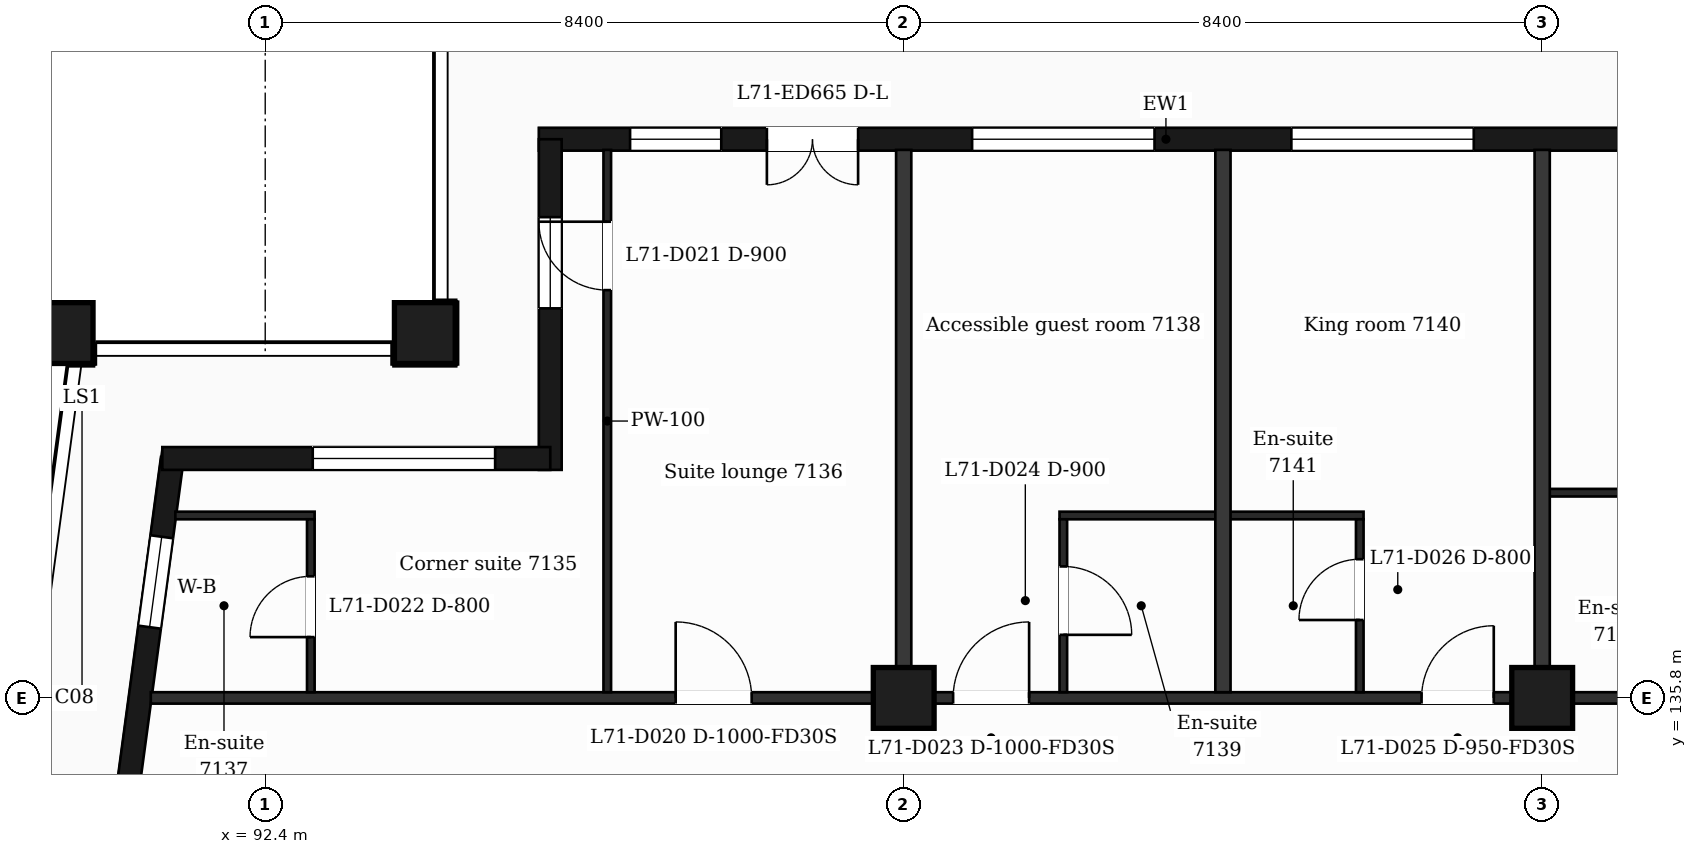
"""IFC4 building model, lengths in metres.
Left out: names, types, materials, properties, quantities, classifications, styles, units other than length and angle.
Written with IfcOpenShell. Run it as: python <this file> out.ifc"""

import sys

from ifc_helpers import new_model, si_unit, direction, frame, frame_2d, origin, origin_2d, place, context, subcontext, project, spatial, rectangle, extrude, element, fill, save


model = new_model("IFC4")
c1 = context("Model", 3, precision=1e-05, world=origin(), true_north=direction((0.0, 1.0)))
c2 = subcontext(c1, "Body", "Model", "MODEL_VIEW")
j1 = project(units=[si_unit("LENGTHUNIT", "METRE"), si_unit("PLANEANGLEUNIT", "RADIAN")], contexts=[c1])
p1 = place(None, origin())
s1 = spatial("IfcSite", under=j1, at=p1, CompositionType="ELEMENT")
p2 = place(p1, origin())
s2 = spatial("IfcBuilding", under=s1, at=p2, CompositionType="ELEMENT")
p3 = place(p2, frame((0.0, 0.0, 292.3)))
s3 = spatial("IfcBuildingStorey", under=s2, at=p3, CompositionType="ELEMENT", Elevation=292.3)
for number, where, z_axis, x_axis in (
    (1, (94.5, 140.6, 0.0), (0.0, 0.0, 1.0), (1.0, 0.0, 0.0)),
    (2, (89.735, 140.6, 0.0), (0.0, 0.0, 1.0), (1.0, 0.0, 0.0)),
    (3, (100.8, 135.8, 0.0), (0.0, 0.0, 1.0), (1.0, 0.0, 0.0)),
    (4, (109.2, 135.8, 0.0), (0.0, 0.0, 1.0), (1.0, 0.0, 0.0)),
):
    element("IfcColumn", number, at=place(p3, frame(where, z_axis=z_axis, x_axis=x_axis)), inside=s3, PredefinedType="COLUMN", context=c2, shape_type="SweptSolid", body=[
        extrude(rectangle(XDim=0.8, YDim=0.8, at=origin_2d()), origin(), (0.0, 0.0, 1.0), 3.7),
    ])
p4 = place(p3, frame((91.177, 138.95, 0.0), z_axis=(0.0, 0.0, 1.0), x_axis=(-0.133426664613, -0.991058689065, 0.0)))
e5 = element("IfcWall", 5, at=p4, inside=s3, PredefinedType="SOLIDWALL", context=c2, shape_type="SweptSolid", body=[
    extrude(rectangle(XDim=6.609, YDim=0.3, at=frame_2d((3.305, 0.0))), origin(), (0.0, 0.0, 1.0), 3.38),
])
p5 = place(p4, frame((1.039, 0.0, 0.9)))
e6 = element("IfcOpeningElement", 6, at=p5, cuts=e5, PredefinedType="OPENING", context=c2, shape_type="SweptSolid", body=[
    extrude(rectangle(XDim=1.2, YDim=2.1, at=frame_2d((0.6, 1.05))), frame((0.0, 0.16, 0.0), z_axis=(0.0, -1.0, 0.0), x_axis=(1.0, 0.0, 0.0)), (0.0, 0.0, 1.0), 0.32),
])
p6 = place(p4, frame((4.294, 0.0, 0.0)))
e7 = element("IfcOpeningElement", 7, at=p6, cuts=e5, PredefinedType="OPENING", context=c2, shape_type="SweptSolid", body=[
    extrude(rectangle(XDim=1.2, YDim=2.4, at=frame_2d((0.6, 1.2))), frame((0.0, 0.16, 0.0), z_axis=(0.0, -1.0, 0.0), x_axis=(1.0, 0.0, 0.0)), (0.0, 0.0, 1.0), 0.32),
])
p7 = place(p3, frame((112.5, 143.15, 0.0), z_axis=(0.0, 0.0, 1.0), x_axis=(-1.0, 0.0, 0.0)))
e8 = element("IfcWall", 8, at=p7, inside=s3, PredefinedType="SOLIDWALL", context=c2, shape_type="SweptSolid", body=[
    extrude(rectangle(XDim=16.5, YDim=0.3, at=frame_2d((8.25, 0.0))), origin(), (0.0, 0.0, 1.0), 3.38),
])
p8 = place(p7, frame((1.1, 0.0, 0.9)))
e9 = element("IfcOpeningElement", 9, at=p8, cuts=e8, PredefinedType="OPENING", context=c2, shape_type="SweptSolid", body=[
    extrude(rectangle(XDim=1.2, YDim=2.1, at=frame_2d((0.6, 1.05))), frame((0.0, 0.16, 0.0), z_axis=(0.0, -1.0, 0.0), x_axis=(1.0, 0.0, 0.0)), (0.0, 0.0, 1.0), 0.32),
])
p9 = place(p7, frame((4.2, 0.0, 0.9)))
e10 = element("IfcOpeningElement", 10, at=p9, cuts=e8, PredefinedType="OPENING", context=c2, shape_type="SweptSolid", body=[
    extrude(rectangle(XDim=2.4, YDim=2.1, at=frame_2d((1.2, 1.05))), frame((0.0, 0.16, 0.0), z_axis=(0.0, -1.0, 0.0), x_axis=(1.0, 0.0, 0.0)), (0.0, 0.0, 1.0), 0.32),
])
p10 = place(p7, frame((8.4, 0.0, 0.9)))
e11 = element("IfcOpeningElement", 11, at=p10, cuts=e8, PredefinedType="OPENING", context=c2, shape_type="SweptSolid", body=[
    extrude(rectangle(XDim=2.4, YDim=2.1, at=frame_2d((1.2, 1.05))), frame((0.0, 0.16, 0.0), z_axis=(0.0, -1.0, 0.0), x_axis=(1.0, 0.0, 0.0)), (0.0, 0.0, 1.0), 0.32),
])
p11 = place(p7, frame((12.3, 0.0, 0.0)))
e12 = element("IfcOpeningElement", 12, at=p11, cuts=e8, PredefinedType="OPENING", context=c2, shape_type="SweptSolid", body=[
    extrude(rectangle(XDim=1.2, YDim=2.4, at=frame_2d((0.6, 1.2))), frame((0.0, 0.16, 0.0), z_axis=(0.0, -1.0, 0.0), x_axis=(1.0, 0.0, 0.0)), (0.0, 0.0, 1.0), 0.32),
])
p12 = place(p7, frame((14.1, 0.0, 0.9)))
e13 = element("IfcOpeningElement", 13, at=p12, cuts=e8, PredefinedType="OPENING", context=c2, shape_type="SweptSolid", body=[
    extrude(rectangle(XDim=1.2, YDim=2.1, at=frame_2d((0.6, 1.05))), frame((0.0, 0.16, 0.0), z_axis=(0.0, -1.0, 0.0), x_axis=(1.0, 0.0, 0.0)), (0.0, 0.0, 1.0), 0.32),
])
p13 = place(p3, frame((96.15, 143.15, 0.0), z_axis=(0.0, 0.0, 1.0), x_axis=(0.0, -1.0, 0.0)))
e14 = element("IfcWall", 14, at=p13, inside=s3, PredefinedType="SOLIDWALL", context=c2, shape_type="SweptSolid", body=[
    extrude(rectangle(XDim=4.35, YDim=0.3, at=frame_2d((2.175, 0.0))), origin(), (0.0, 0.0, 1.0), 3.38),
])
p14 = place(p13, frame((1.025, 0.0, 0.9)))
e15 = element("IfcOpeningElement", 15, at=p14, cuts=e14, PredefinedType="OPENING", context=c2, shape_type="SweptSolid", body=[
    extrude(rectangle(XDim=1.2, YDim=2.1, at=frame_2d((0.6, 1.05))), frame((0.0, 0.16, 0.0), z_axis=(0.0, -1.0, 0.0), x_axis=(1.0, 0.0, 0.0)), (0.0, 0.0, 1.0), 0.32),
])
p15 = place(p3, frame((96.15, 138.95, 0.0), z_axis=(0.0, 0.0, 1.0), x_axis=(-1.0, 0.0, 0.0)))
e16 = element("IfcWall", 16, at=p15, inside=s3, PredefinedType="SOLIDWALL", context=c2, shape_type="SweptSolid", body=[
    extrude(rectangle(XDim=5.104, YDim=0.3, at=frame_2d((2.552, 0.0))), origin(), (0.0, 0.0, 1.0), 3.38),
])
p16 = place(p15, frame((0.725, 0.0, 0.9)))
e17 = element("IfcOpeningElement", 17, at=p16, cuts=e16, PredefinedType="OPENING", context=c2, shape_type="SweptSolid", body=[
    extrude(rectangle(XDim=2.4, YDim=2.1, at=frame_2d((1.2, 1.05))), frame((0.0, 0.16, 0.0), z_axis=(0.0, -1.0, 0.0), x_axis=(1.0, 0.0, 0.0)), (0.0, 0.0, 1.0), 0.32),
])
p17 = place(p3, frame((90.895, 135.8, 0.0), z_axis=(0.0, 0.0, 1.0), x_axis=(1.0, 0.0, 0.0)))
e18 = element("IfcWall", 18, at=p17, inside=s3, PredefinedType="PARTITIONING", context=c2, shape_type="SweptSolid", body=[
    extrude(rectangle(XDim=45.011, YDim=0.15, at=frame_2d((22.505, 0.0))), origin(), (0.0, 0.0, 1.0), 3.38),
])
p18 = place(p17, frame((6.906, 0.0, 0.0)))
e19 = element("IfcOpeningElement", 19, at=p18, cuts=e18, PredefinedType="OPENING", context=c2, shape_type="SweptSolid", body=[
    extrude(rectangle(XDim=1.0, YDim=2.1, at=frame_2d((0.5, 1.05))), frame((0.0, 0.085, 0.0), z_axis=(0.0, -1.0, 0.0), x_axis=(1.0, 0.0, 0.0)), (0.0, 0.0, 1.0), 0.17),
])
p19 = place(p17, frame((10.555, 0.0, 0.0)))
e20 = element("IfcOpeningElement", 20, at=p19, cuts=e18, PredefinedType="OPENING", context=c2, shape_type="SweptSolid", body=[
    extrude(rectangle(XDim=1.0, YDim=2.1, at=frame_2d((0.5, 1.05))), frame((0.0, 0.085, 0.0), z_axis=(0.0, -1.0, 0.0), x_axis=(1.0, 0.0, 0.0)), (0.0, 0.0, 1.0), 0.17),
])
p20 = place(p17, frame((16.719, 0.0, 0.0)))
e21 = element("IfcOpeningElement", 21, at=p20, cuts=e18, PredefinedType="OPENING", context=c2, shape_type="SweptSolid", body=[
    extrude(rectangle(XDim=0.95, YDim=2.1, at=frame_2d((0.475, 1.05))), frame((0.0, 0.085, 0.0), z_axis=(0.0, -1.0, 0.0), x_axis=(1.0, 0.0, 0.0)), (0.0, 0.0, 1.0), 0.17),
])
p21 = place(p17, frame((21.281, 0.0, 0.0)))
e22 = element("IfcOpeningElement", 22, at=p21, cuts=e18, PredefinedType="OPENING", context=c2, shape_type="SweptSolid", body=[
    extrude(rectangle(XDim=0.95, YDim=2.1, at=frame_2d((0.475, 1.05))), frame((0.0, 0.085, 0.0), z_axis=(0.0, -1.0, 0.0), x_axis=(1.0, 0.0, 0.0)), (0.0, 0.0, 1.0), 0.17),
])
p22 = place(p17, frame((25.125, 0.0, 0.0)))
e23 = element("IfcOpeningElement", 23, at=p22, cuts=e18, PredefinedType="OPENING", context=c2, shape_type="SweptSolid", body=[
    extrude(rectangle(XDim=0.95, YDim=2.1, at=frame_2d((0.475, 1.05))), frame((0.0, 0.085, 0.0), z_axis=(0.0, -1.0, 0.0), x_axis=(1.0, 0.0, 0.0)), (0.0, 0.0, 1.0), 0.17),
])
p23 = place(p17, frame((27.393, 0.0, 0.0)))
e24 = element("IfcOpeningElement", 24, at=p23, cuts=e18, PredefinedType="OPENING", context=c2, shape_type="SweptSolid", body=[
    extrude(rectangle(XDim=0.95, YDim=2.1, at=frame_2d((0.475, 1.05))), frame((0.0, 0.085, 0.0), z_axis=(0.0, -1.0, 0.0), x_axis=(1.0, 0.0, 0.0)), (0.0, 0.0, 1.0), 0.17),
])
p24 = place(p17, frame((33.518, 0.0, 0.0)))
e25 = element("IfcOpeningElement", 25, at=p24, cuts=e18, PredefinedType="OPENING", context=c2, shape_type="SweptSolid", body=[
    extrude(rectangle(XDim=0.95, YDim=2.1, at=frame_2d((0.475, 1.05))), frame((0.0, 0.085, 0.0), z_axis=(0.0, -1.0, 0.0), x_axis=(1.0, 0.0, 0.0)), (0.0, 0.0, 1.0), 0.17),
])
p25 = place(p17, frame((37.195, 0.0, 0.0)))
e26 = element("IfcOpeningElement", 26, at=p25, cuts=e18, PredefinedType="OPENING", context=c2, shape_type="SweptSolid", body=[
    extrude(rectangle(XDim=1.0, YDim=2.1, at=frame_2d((0.5, 1.05))), frame((0.0, 0.085, 0.0), z_axis=(0.0, -1.0, 0.0), x_axis=(1.0, 0.0, 0.0)), (0.0, 0.0, 1.0), 0.17),
])
p26 = place(p3, frame((91.218, 138.2, 0.0), z_axis=(0.0, 0.0, 1.0), x_axis=(1.0, 0.0, 0.0)))
e27 = element("IfcWall", 27, at=p26, inside=s3, PredefinedType="PARTITIONING", context=c2, shape_type="SweptSolid", body=[
    extrude(rectangle(XDim=1.832, YDim=0.1, at=frame_2d((0.916, 0.0))), origin(), (0.0, 0.0, 1.0), 3.38),
])
p27 = place(p3, frame((102.85, 138.2, 0.0), z_axis=(0.0, 0.0, 1.0), x_axis=(1.0, 0.0, 0.0)))
e28 = element("IfcWall", 28, at=p27, inside=s3, PredefinedType="PARTITIONING", context=c2, shape_type="SweptSolid", body=[
    extrude(rectangle(XDim=4.0, YDim=0.1, at=frame_2d((2.0, 0.0))), origin(), (0.0, 0.0, 1.0), 3.38),
])
p28 = place(p3, frame((109.2, 138.5, 0.0), z_axis=(0.0, 0.0, 1.0), x_axis=(1.0, 0.0, 0.0)))
e29 = element("IfcWall", 29, at=p28, inside=s3, PredefinedType="PARTITIONING", context=c2, shape_type="SweptSolid", body=[
    extrude(rectangle(XDim=2.75, YDim=0.1, at=frame_2d((1.375, 0.0))), origin(), (0.0, 0.0, 1.0), 3.38),
])
p29 = place(p3, frame((93.0, 135.875, 0.0), z_axis=(0.0, 0.0, 1.0), x_axis=(0.0, 1.0, 0.0)))
e30 = element("IfcWall", 30, at=p29, inside=s3, PredefinedType="PARTITIONING", context=c2, shape_type="SweptSolid", body=[
    extrude(rectangle(XDim=2.275, YDim=0.1, at=frame_2d((1.137, 0.0))), origin(), (0.0, 0.0, 1.0), 3.38),
])
p30 = place(p29, frame((0.725, 0.0, 0.0)))
e31 = element("IfcOpeningElement", 31, at=p30, cuts=e30, PredefinedType="OPENING", context=c2, shape_type="SweptSolid", body=[
    extrude(rectangle(XDim=0.8, YDim=2.1, at=frame_2d((0.4, 1.05))), frame((0.0, 0.06, 0.0), z_axis=(0.0, -1.0, 0.0), x_axis=(1.0, 0.0, 0.0)), (0.0, 0.0, 1.0), 0.12),
])
p31 = place(p3, frame((96.9, 135.875, 0.0), z_axis=(0.0, 0.0, 1.0), x_axis=(0.0, 1.0, 0.0)))
e32 = element("IfcWall", 32, at=p31, inside=s3, PredefinedType="PARTITIONING", context=c2, shape_type="SweptSolid", body=[
    extrude(rectangle(XDim=7.135, YDim=0.1, at=frame_2d((3.567, 0.0))), origin(), (0.0, 0.0, 1.0), 3.38),
])
p32 = place(p31, frame((5.29, 0.0, 0.0)))
e33 = element("IfcOpeningElement", 33, at=p32, cuts=e32, PredefinedType="OPENING", context=c2, shape_type="SweptSolid", body=[
    extrude(rectangle(XDim=0.9, YDim=2.1, at=frame_2d((0.45, 1.05))), frame((0.0, 0.06, 0.0), z_axis=(0.0, -1.0, 0.0), x_axis=(1.0, 0.0, 0.0)), (0.0, 0.0, 1.0), 0.12),
])
p33 = place(p3, frame((100.8, 135.875, 0.0), z_axis=(0.0, 0.0, 1.0), x_axis=(0.0, 1.0, 0.0)))
e34 = element("IfcWall", 34, at=p33, inside=s3, PredefinedType="PARTITIONING", context=c2, shape_type="SweptSolid", body=[
    extrude(rectangle(XDim=7.135, YDim=0.2, at=frame_2d((3.567, 0.0))), origin(), (0.0, 0.0, 1.0), 3.38),
])
p34 = place(p3, frame((102.9, 135.875, 0.0), z_axis=(0.0, 0.0, 1.0), x_axis=(0.0, 1.0, 0.0)))
e35 = element("IfcWall", 35, at=p34, inside=s3, PredefinedType="PARTITIONING", context=c2, shape_type="SweptSolid", body=[
    extrude(rectangle(XDim=2.275, YDim=0.1, at=frame_2d((1.137, 0.0))), origin(), (0.0, 0.0, 1.0), 3.38),
])
p35 = place(p34, frame((0.755, 0.0, 0.0)))
e36 = element("IfcOpeningElement", 36, at=p35, cuts=e35, PredefinedType="OPENING", context=c2, shape_type="SweptSolid", body=[
    extrude(rectangle(XDim=0.9, YDim=2.1, at=frame_2d((0.45, 1.05))), frame((0.0, 0.06, 0.0), z_axis=(0.0, -1.0, 0.0), x_axis=(1.0, 0.0, 0.0)), (0.0, 0.0, 1.0), 0.12),
])
p36 = place(p3, frame((105.0, 135.875, 0.0), z_axis=(0.0, 0.0, 1.0), x_axis=(0.0, 1.0, 0.0)))
e37 = element("IfcWall", 37, at=p36, inside=s3, PredefinedType="PARTITIONING", context=c2, shape_type="SweptSolid", body=[
    extrude(rectangle(XDim=7.135, YDim=0.2, at=frame_2d((3.567, 0.0))), origin(), (0.0, 0.0, 1.0), 3.38),
])
p37 = place(p3, frame((106.8, 135.875, 0.0), z_axis=(0.0, 0.0, 1.0), x_axis=(0.0, 1.0, 0.0)))
e38 = element("IfcWall", 38, at=p37, inside=s3, PredefinedType="PARTITIONING", context=c2, shape_type="SweptSolid", body=[
    extrude(rectangle(XDim=2.275, YDim=0.1, at=frame_2d((1.137, 0.0))), origin(), (0.0, 0.0, 1.0), 3.38),
])
p38 = place(p37, frame((0.95, 0.0, 0.0)))
e39 = element("IfcOpeningElement", 39, at=p38, cuts=e38, PredefinedType="OPENING", context=c2, shape_type="SweptSolid", body=[
    extrude(rectangle(XDim=0.8, YDim=2.1, at=frame_2d((0.4, 1.05))), frame((0.0, 0.06, 0.0), z_axis=(0.0, -1.0, 0.0), x_axis=(1.0, 0.0, 0.0)), (0.0, 0.0, 1.0), 0.12),
])
p39 = place(p3, frame((109.2, 135.875, 0.0), z_axis=(0.0, 0.0, 1.0), x_axis=(0.0, 1.0, 0.0)))
e40 = element("IfcWall", 40, at=p39, inside=s3, PredefinedType="PARTITIONING", context=c2, shape_type="SweptSolid", body=[
    extrude(rectangle(XDim=7.135, YDim=0.2, at=frame_2d((3.567, 0.0))), origin(), (0.0, 0.0, 1.0), 3.38),
])
p40 = place(p5, origin())
e41 = element("IfcWindow", 41, at=p40, inside=s3, PartitioningType="SINGLE_PANEL", PredefinedType="WINDOW", context=c2, shape_type="SweptSolid", body=[
    extrude(rectangle(XDim=1.2, YDim=2.1, at=frame_2d((0.6, 1.05))), frame((0.0, 0.03, 0.0), z_axis=(0.0, -1.0, 0.0), x_axis=(1.0, 0.0, 0.0)), (0.0, 0.0, 1.0), 0.06),
])
fill(e6, e41)
p41 = place(p8, origin())
e42 = element("IfcWindow", 42, at=p41, inside=s3, PartitioningType="SINGLE_PANEL", PredefinedType="WINDOW", context=c2, shape_type="SweptSolid", body=[
    extrude(rectangle(XDim=1.2, YDim=2.1, at=frame_2d((0.6, 1.05))), frame((0.0, 0.03, 0.0), z_axis=(0.0, -1.0, 0.0), x_axis=(1.0, 0.0, 0.0)), (0.0, 0.0, 1.0), 0.06),
])
fill(e9, e42)
p42 = place(p9, origin())
e43 = element("IfcWindow", 43, at=p42, inside=s3, PartitioningType="SINGLE_PANEL", PredefinedType="WINDOW", context=c2, shape_type="SweptSolid", body=[
    extrude(rectangle(XDim=2.4, YDim=2.1, at=frame_2d((1.2, 1.05))), frame((0.0, 0.03, 0.0), z_axis=(0.0, -1.0, 0.0), x_axis=(1.0, 0.0, 0.0)), (0.0, 0.0, 1.0), 0.06),
])
fill(e10, e43)
p43 = place(p10, origin())
e44 = element("IfcWindow", 44, at=p43, inside=s3, PartitioningType="SINGLE_PANEL", PredefinedType="WINDOW", context=c2, shape_type="SweptSolid", body=[
    extrude(rectangle(XDim=2.4, YDim=2.1, at=frame_2d((1.2, 1.05))), frame((0.0, 0.03, 0.0), z_axis=(0.0, -1.0, 0.0), x_axis=(1.0, 0.0, 0.0)), (0.0, 0.0, 1.0), 0.06),
])
fill(e11, e44)
p44 = place(p11, origin())
e45 = element("IfcDoor", 45, at=p44, inside=s3, OperationType="DOUBLE_DOOR_SINGLE_SWING", PredefinedType="DOOR", context=c2, shape_type="SweptSolid", body=[
    extrude(rectangle(XDim=1.2, YDim=2.4, at=frame_2d((0.6, 1.2))), frame((0.0, 0.025, 0.0), z_axis=(0.0, -1.0, 0.0), x_axis=(1.0, 0.0, 0.0)), (0.0, 0.0, 1.0), 0.05),
])
fill(e12, e45)
p45 = place(p12, origin())
e46 = element("IfcWindow", 46, at=p45, inside=s3, PartitioningType="SINGLE_PANEL", PredefinedType="WINDOW", context=c2, shape_type="SweptSolid", body=[
    extrude(rectangle(XDim=1.2, YDim=2.1, at=frame_2d((0.6, 1.05))), frame((0.0, 0.03, 0.0), z_axis=(0.0, -1.0, 0.0), x_axis=(1.0, 0.0, 0.0)), (0.0, 0.0, 1.0), 0.06),
])
fill(e13, e46)
p46 = place(p14, origin())
e47 = element("IfcWindow", 47, at=p46, inside=s3, PartitioningType="SINGLE_PANEL", PredefinedType="WINDOW", context=c2, shape_type="SweptSolid", body=[
    extrude(rectangle(XDim=1.2, YDim=2.1, at=frame_2d((0.6, 1.05))), frame((0.0, 0.03, 0.0), z_axis=(0.0, -1.0, 0.0), x_axis=(1.0, 0.0, 0.0)), (0.0, 0.0, 1.0), 0.06),
])
fill(e15, e47)
p47 = place(p16, origin())
e48 = element("IfcWindow", 48, at=p47, inside=s3, PartitioningType="SINGLE_PANEL", PredefinedType="WINDOW", context=c2, shape_type="SweptSolid", body=[
    extrude(rectangle(XDim=2.4, YDim=2.1, at=frame_2d((1.2, 1.05))), frame((0.0, 0.03, 0.0), z_axis=(0.0, -1.0, 0.0), x_axis=(1.0, 0.0, 0.0)), (0.0, 0.0, 1.0), 0.06),
])
fill(e17, e48)
p48 = place(p18, origin())
e49 = element("IfcDoor", 49, at=p48, inside=s3, OperationType="SINGLE_SWING_LEFT", PredefinedType="DOOR", context=c2, shape_type="SweptSolid", body=[
    extrude(rectangle(XDim=1.0, YDim=2.1, at=frame_2d((0.5, 1.05))), frame((0.0, 0.025, 0.0), z_axis=(0.0, -1.0, 0.0), x_axis=(1.0, 0.0, 0.0)), (0.0, 0.0, 1.0), 0.05),
])
fill(e19, e49)
p49 = place(p32, origin())
e50 = element("IfcDoor", 50, at=p49, inside=s3, OperationType="SINGLE_SWING_RIGHT", PredefinedType="DOOR", context=c2, shape_type="SweptSolid", body=[
    extrude(rectangle(XDim=0.9, YDim=2.1, at=frame_2d((0.45, 1.05))), frame((0.0, 0.025, 0.0), z_axis=(0.0, -1.0, 0.0), x_axis=(1.0, 0.0, 0.0)), (0.0, 0.0, 1.0), 0.05),
])
fill(e33, e50)
p50 = place(p30, origin())
e51 = element("IfcDoor", 51, at=p50, inside=s3, OperationType="SINGLE_SWING_LEFT", PredefinedType="DOOR", context=c2, shape_type="SweptSolid", body=[
    extrude(rectangle(XDim=0.8, YDim=2.1, at=frame_2d((0.4, 1.05))), frame((0.0, 0.025, 0.0), z_axis=(0.0, -1.0, 0.0), x_axis=(1.0, 0.0, 0.0)), (0.0, 0.0, 1.0), 0.05),
])
fill(e31, e51)
p51 = place(p19, origin())
e52 = element("IfcDoor", 52, at=p51, inside=s3, OperationType="SINGLE_SWING_RIGHT", PredefinedType="DOOR", context=c2, shape_type="SweptSolid", body=[
    extrude(rectangle(XDim=1.0, YDim=2.1, at=frame_2d((0.5, 1.05))), frame((0.0, 0.025, 0.0), z_axis=(0.0, -1.0, 0.0), x_axis=(1.0, 0.0, 0.0)), (0.0, 0.0, 1.0), 0.05),
])
fill(e20, e52)
p52 = place(p35, origin())
e53 = element("IfcDoor", 53, at=p52, inside=s3, OperationType="SINGLE_SWING_LEFT", PredefinedType="DOOR", context=c2, shape_type="SweptSolid", body=[
    extrude(rectangle(XDim=0.9, YDim=2.1, at=frame_2d((0.45, 1.05))), frame((0.0, 0.025, 0.0), z_axis=(0.0, -1.0, 0.0), x_axis=(1.0, 0.0, 0.0)), (0.0, 0.0, 1.0), 0.05),
])
fill(e36, e53)
p53 = place(p20, origin())
e54 = element("IfcDoor", 54, at=p53, inside=s3, OperationType="SINGLE_SWING_RIGHT", PredefinedType="DOOR", context=c2, shape_type="SweptSolid", body=[
    extrude(rectangle(XDim=0.95, YDim=2.1, at=frame_2d((0.475, 1.05))), frame((0.0, 0.025, 0.0), z_axis=(0.0, -1.0, 0.0), x_axis=(1.0, 0.0, 0.0)), (0.0, 0.0, 1.0), 0.05),
])
fill(e21, e54)
p54 = place(p38, origin())
e55 = element("IfcDoor", 55, at=p54, inside=s3, OperationType="SINGLE_SWING_LEFT", PredefinedType="DOOR", context=c2, shape_type="SweptSolid", body=[
    extrude(rectangle(XDim=0.8, YDim=2.1, at=frame_2d((0.4, 1.05))), frame((0.0, 0.025, 0.0), z_axis=(0.0, -1.0, 0.0), x_axis=(1.0, 0.0, 0.0)), (0.0, 0.0, 1.0), 0.05),
])
fill(e39, e55)
save(model, sys.argv[1])
